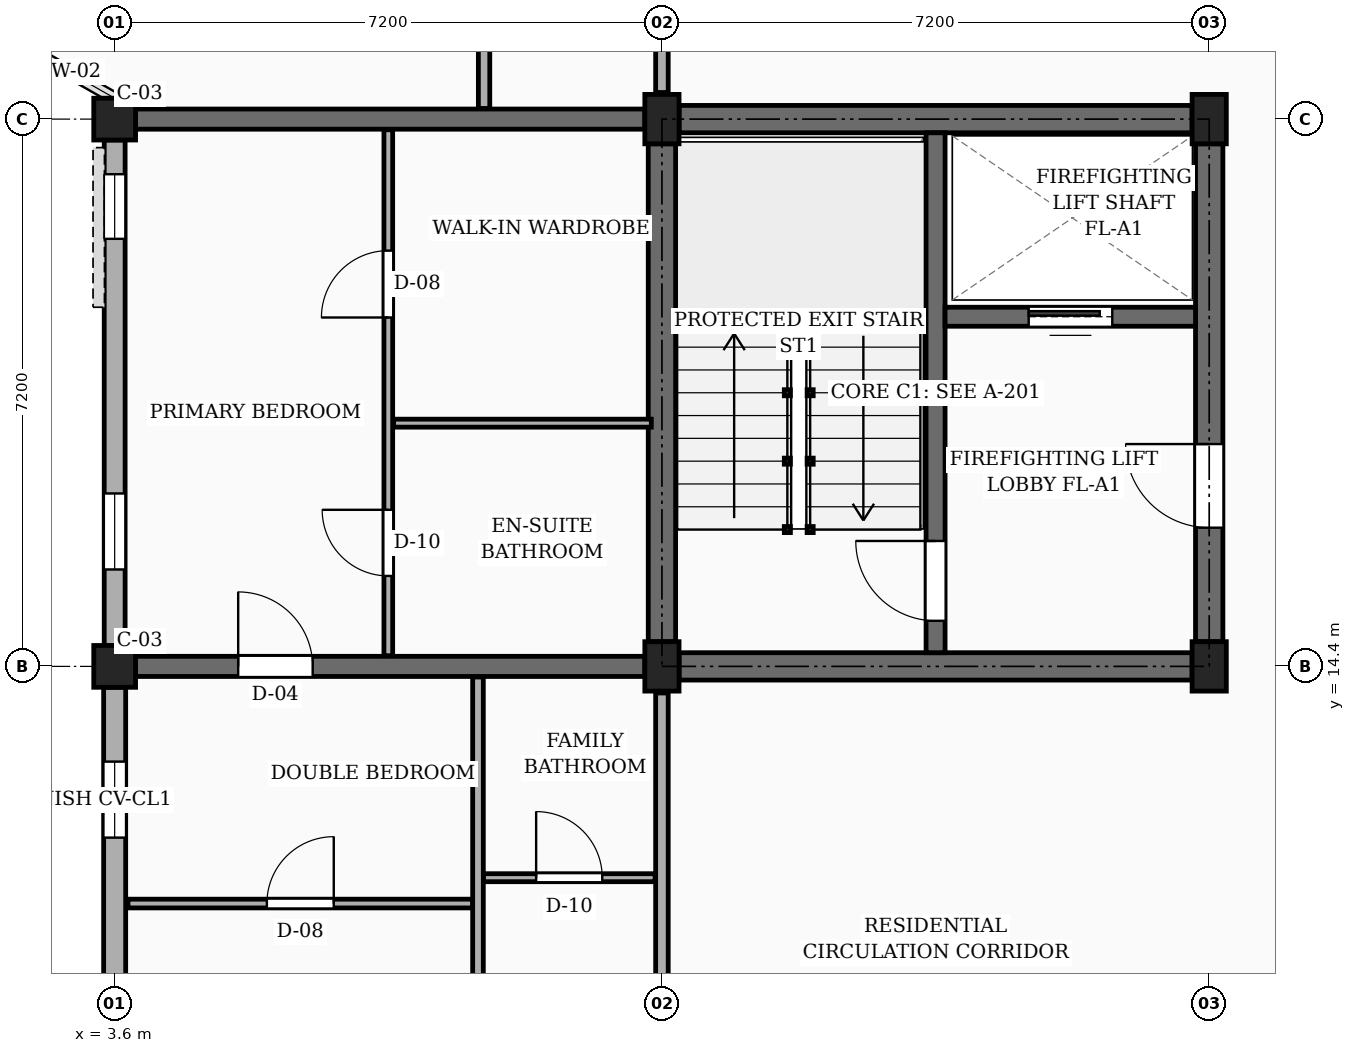
"""IFC4 building model, lengths in metres.
Left out: names, types, materials, properties, quantities, classifications, styles, units other than length and angle.
Written with IfcOpenShell. Run it as: python <this file> out.ifc"""

import sys

from ifc_helpers import new_model, si_unit, direction, frame, frame_2d, origin, origin_2d, place, context, subcontext, project, spatial, rectangle, extrude, element, fill, save


model = new_model("IFC4")
c1 = context("Model", 3, precision=1e-05, world=origin(), true_north=direction((0.0, 1.0)))
c2 = subcontext(c1, "Body", "Model", "MODEL_VIEW")
j1 = project(units=[si_unit("LENGTHUNIT", "METRE"), si_unit("PLANEANGLEUNIT", "RADIAN")], contexts=[c1])
p1 = place(None, origin())
s1 = spatial("IfcSite", under=j1, at=p1, CompositionType="ELEMENT")
p2 = place(p1, origin())
s2 = spatial("IfcBuilding", under=s1, at=p2, CompositionType="ELEMENT")
p3 = place(p2, frame((0.0, 0.0, 10.8)))
s3 = spatial("IfcBuildingStorey", under=s2, at=p3, CompositionType="ELEMENT", Elevation=10.8)
for number, where, z_axis, x_axis in (
    (1, (3.6, 14.4, 0.0), (0.0, 0.0, 1.0), (1.0, 0.0, 0.0)),
    (2, (3.6, 21.6, 0.0), (0.0, 0.0, 1.0), (1.0, 0.0, 0.0)),
):
    element("IfcColumn", number, at=place(p3, frame(where, z_axis=z_axis, x_axis=x_axis)), inside=s3, PredefinedType="COLUMN", context=c2, shape_type="SweptSolid", body=[
        extrude(rectangle(XDim=0.55, YDim=0.55, at=origin_2d()), origin(), (0.0, 0.0, 1.0), 3.15),
    ])
for number, where, z_axis, x_axis in (
    (3, (10.8, 14.4, 0.0), (0.0, 0.0, 1.0), (1.0, 0.0, 0.0)),
    (4, (10.8, 21.6, 0.0), (0.0, 0.0, 1.0), (1.0, 0.0, 0.0)),
    (5, (18.0, 14.4, 0.0), (0.0, 0.0, 1.0), (1.0, 0.0, 0.0)),
    (6, (18.0, 21.6, 0.0), (0.0, 0.0, 1.0), (1.0, 0.0, 0.0)),
):
    element("IfcColumn", number, at=place(p3, frame(where, z_axis=z_axis, x_axis=x_axis)), inside=s3, PredefinedType="COLUMN", context=c2, shape_type="SweptSolid", body=[
        extrude(rectangle(XDim=0.45, YDim=0.65, at=origin_2d()), origin(), (0.0, 0.0, 1.0), 3.15),
    ])
p4 = place(p3, frame((3.875, 14.4, 0.0), z_axis=(0.0, 0.0, 1.0), x_axis=(1.0, 0.0, 0.0)))
e7 = element("IfcWall", 7, at=p4, inside=s3, PredefinedType="SOLIDWALL", context=c2, shape_type="SweptSolid", body=[
    extrude(rectangle(XDim=6.7, YDim=0.265, at=frame_2d((3.35, 0.0))), origin(), (0.0, 0.0, 1.0), 2.17),
])
p5 = place(p4, frame((1.35, 0.0, 0.0)))
e8 = element("IfcOpeningElement", 8, at=p5, cuts=e7, PredefinedType="OPENING", context=c2, shape_type="SweptSolid", body=[
    extrude(rectangle(XDim=0.98, YDim=2.12, at=frame_2d((0.49, 1.06))), frame((0.0, 0.143, 0.0), z_axis=(0.0, -1.0, 0.0), x_axis=(1.0, 0.0, 0.0)), (0.0, 0.0, 1.0), 0.285),
])
p6 = place(p3, frame((3.875, 21.6, 0.0), z_axis=(0.0, 0.0, 1.0), x_axis=(1.0, 0.0, 0.0)))
e9 = element("IfcWall", 9, at=p6, inside=s3, PredefinedType="SOLIDWALL", context=c2, shape_type="SweptSolid", body=[
    extrude(rectangle(XDim=6.7, YDim=0.265, at=frame_2d((3.35, 0.0))), origin(), (0.0, 0.0, 1.0), 2.17),
])
p7 = place(p3, frame((3.6, 21.325, 0.0), z_axis=(0.0, 0.0, 1.0), x_axis=(0.0, -1.0, 0.0)))
e10 = element("IfcWall", 10, at=p7, inside=s3, PredefinedType="SOLIDWALL", context=c2, shape_type="SweptSolid", body=[
    extrude(rectangle(XDim=6.65, YDim=0.275, at=frame_2d((3.325, 0.0))), origin(), (0.0, 0.0, 1.0), 2.44),
])
p8 = place(p7, frame((0.45, 0.0, 0.78)))
e11 = element("IfcOpeningElement", 11, at=p8, cuts=e10, PredefinedType="OPENING", context=c2, shape_type="SweptSolid", body=[
    extrude(rectangle(XDim=0.85, YDim=1.15, at=frame_2d((0.425, 0.575))), frame((0.0, 0.147, 0.0), z_axis=(0.0, -1.0, 0.0), x_axis=(1.0, 0.0, 0.0)), (0.0, 0.0, 1.0), 0.295),
])
p9 = place(p7, frame((4.65, 0.0, 0.78)))
e12 = element("IfcOpeningElement", 12, at=p9, cuts=e10, PredefinedType="OPENING", context=c2, shape_type="SweptSolid", body=[
    extrude(rectangle(XDim=1.0, YDim=1.15, at=frame_2d((0.5, 0.575))), frame((0.0, 0.147, 0.0), z_axis=(0.0, -1.0, 0.0), x_axis=(1.0, 0.0, 0.0)), (0.0, 0.0, 1.0), 0.295),
])
p10 = place(p3, frame((3.6, 14.125, 0.0), z_axis=(0.0, 0.0, 1.0), x_axis=(0.0, -1.0, 0.0)))
e13 = element("IfcWall", 13, at=p10, inside=s3, PredefinedType="SOLIDWALL", context=c2, shape_type="SweptSolid", body=[
    extrude(rectangle(XDim=3.905, YDim=0.29, at=frame_2d((1.953, 0.0))), origin(), (0.0, 0.0, 1.0), 2.44),
])
p11 = place(p10, frame((0.978, 0.0, 0.78)))
e14 = element("IfcOpeningElement", 14, at=p11, cuts=e13, PredefinedType="OPENING", context=c2, shape_type="SweptSolid", body=[
    extrude(rectangle(XDim=1.0, YDim=1.15, at=frame_2d((0.5, 0.575))), frame((0.0, 0.155, 0.0), z_axis=(0.0, -1.0, 0.0), x_axis=(1.0, 0.0, 0.0)), (0.0, 0.0, 1.0), 0.31),
])
p12 = place(p3, frame((10.8, 14.725, 0.0), z_axis=(0.0, 0.0, 1.0), x_axis=(0.0, 1.0, 0.0)))
e15 = element("IfcWall", 15, at=p12, inside=s3, PredefinedType="SHEAR", context=c2, shape_type="SweptSolid", body=[
    extrude(rectangle(XDim=6.55, YDim=0.36, at=frame_2d((3.275, 0.0))), origin(), (0.0, 0.0, 1.0), 2.87),
])
p13 = place(p3, frame((11.025, 21.6, 0.0), z_axis=(0.0, 0.0, 1.0), x_axis=(1.0, 0.0, 0.0)))
e16 = element("IfcWall", 16, at=p13, inside=s3, PredefinedType="SHEAR", context=c2, shape_type="SweptSolid", body=[
    extrude(rectangle(XDim=6.75, YDim=0.36, at=frame_2d((3.375, 0.0))), origin(), (0.0, 0.0, 1.0), 2.87),
])
p14 = place(p3, frame((18.0, 14.725, 0.0), z_axis=(0.0, 0.0, 1.0), x_axis=(0.0, 1.0, 0.0)))
e17 = element("IfcWall", 17, at=p14, inside=s3, PredefinedType="SHEAR", context=c2, shape_type="SweptSolid", body=[
    extrude(rectangle(XDim=6.55, YDim=0.36, at=frame_2d((3.275, 0.0))), origin(), (0.0, 0.0, 1.0), 2.87),
])
p15 = place(p14, frame((1.5, 0.0, 0.0)))
e18 = element("IfcOpeningElement", 18, at=p15, cuts=e17, PredefinedType="OPENING", context=c2, shape_type="SweptSolid", body=[
    extrude(rectangle(XDim=1.1, YDim=2.15, at=frame_2d((0.55, 1.075))), frame((0.0, 0.19, 0.0), z_axis=(0.0, -1.0, 0.0), x_axis=(1.0, 0.0, 0.0)), (0.0, 0.0, 1.0), 0.38),
])
p16 = place(p3, frame((11.025, 14.4, 0.0), z_axis=(0.0, 0.0, 1.0), x_axis=(1.0, 0.0, 0.0)))
e19 = element("IfcWall", 19, at=p16, inside=s3, PredefinedType="SHEAR", context=c2, shape_type="SweptSolid", body=[
    extrude(rectangle(XDim=6.75, YDim=0.36, at=frame_2d((3.375, 0.0))), origin(), (0.0, 0.0, 1.0), 2.87),
])
p17 = place(p3, frame((14.4, 14.58, 0.0), z_axis=(0.0, 0.0, 1.0), x_axis=(0.0, 1.0, 0.0)))
e20 = element("IfcWall", 20, at=p17, inside=s3, PredefinedType="SHEAR", context=c2, shape_type="SweptSolid", body=[
    extrude(rectangle(XDim=6.84, YDim=0.25, at=frame_2d((3.42, 0.0))), origin(), (0.0, 0.0, 1.0), 2.87),
])
p18 = place(p17, frame((0.42, 0.0, 0.0)))
e21 = element("IfcOpeningElement", 21, at=p18, cuts=e20, PredefinedType="OPENING", context=c2, shape_type="SweptSolid", body=[
    extrude(rectangle(XDim=1.05, YDim=2.15, at=frame_2d((0.525, 1.075))), frame((0.0, 0.135, 0.0), z_axis=(0.0, -1.0, 0.0), x_axis=(1.0, 0.0, 0.0)), (0.0, 0.0, 1.0), 0.27),
])
p19 = place(p3, frame((14.525, 19.0, 0.0), z_axis=(0.0, 0.0, 1.0), x_axis=(1.0, 0.0, 0.0)))
e22 = element("IfcWall", 22, at=p19, inside=s3, PredefinedType="SHEAR", context=c2, shape_type="SweptSolid", body=[
    extrude(rectangle(XDim=3.295, YDim=0.25, at=frame_2d((1.647, 0.0))), origin(), (0.0, 0.0, 1.0), 2.87),
])
p20 = place(p19, frame((1.1, 0.0, 0.0)))
e23 = element("IfcOpeningElement", 23, at=p20, cuts=e22, PredefinedType="OPENING", context=c2, shape_type="SweptSolid", body=[
    extrude(rectangle(XDim=1.1, YDim=2.2, at=frame_2d((0.55, 1.1))), frame((0.0, 0.135, 0.0), z_axis=(0.0, -1.0, 0.0), x_axis=(1.0, 0.0, 0.0)), (0.0, 0.0, 1.0), 0.27),
])
p21 = place(p3, frame((10.8, 7.55, 0.0), z_axis=(0.0, 0.0, 1.0), x_axis=(0.0, 1.0, 0.0)))
e24 = element("IfcWall", 24, at=p21, inside=s3, PredefinedType="PARTITIONING", context=c2, shape_type="SweptSolid", body=[
    extrude(rectangle(XDim=6.5, YDim=0.165, at=frame_2d((3.25, 0.0))), origin(), (0.0, 0.0, 1.0), 2.22),
])
p22 = place(p21, frame((1.0, 0.0, 0.0)))
e25 = element("IfcOpeningElement", 25, at=p22, cuts=e24, PredefinedType="OPENING", context=c2, shape_type="SweptSolid", body=[
    extrude(rectangle(XDim=0.94, YDim=2.12, at=frame_2d((0.47, 1.06))), frame((0.0, 0.093, 0.0), z_axis=(0.0, -1.0, 0.0), x_axis=(1.0, 0.0, 0.0)), (0.0, 0.0, 1.0), 0.185),
])
p23 = place(p3, frame((10.8, 21.95, 0.0), z_axis=(0.0, 0.0, 1.0), x_axis=(0.0, 1.0, 0.0)))
e26 = element("IfcWall", 26, at=p23, inside=s3, PredefinedType="PARTITIONING", context=c2, shape_type="SweptSolid", body=[
    extrude(rectangle(XDim=6.5, YDim=0.165, at=frame_2d((3.25, 0.0))), origin(), (0.0, 0.0, 1.0), 2.22),
])
p24 = place(p23, frame((1.0, 0.0, 0.0)))
e27 = element("IfcOpeningElement", 27, at=p24, cuts=e26, PredefinedType="OPENING", context=c2, shape_type="SweptSolid", body=[
    extrude(rectangle(XDim=1.14, YDim=2.18, at=frame_2d((0.57, 1.09))), frame((0.0, 0.093, 0.0), z_axis=(0.0, -1.0, 0.0), x_axis=(1.0, 0.0, 0.0)), (0.0, 0.0, 1.0), 0.185),
])
p25 = place(p3, frame((3.775, 11.28, 0.0), z_axis=(0.0, 0.0, 1.0), x_axis=(1.0, 0.0, 0.0)))
e28 = element("IfcWall", 28, at=p25, inside=s3, PredefinedType="PARTITIONING", context=c2, shape_type="SweptSolid", body=[
    extrude(rectangle(XDim=4.535, YDim=0.115, at=frame_2d((2.268, 0.0))), origin(), (0.0, 0.0, 1.0), 2.305),
])
p26 = place(p25, frame((1.827, 0.0, 0.0)))
e29 = element("IfcOpeningElement", 29, at=p26, cuts=e28, PredefinedType="OPENING", context=c2, shape_type="SweptSolid", body=[
    extrude(rectangle(XDim=0.88, YDim=2.08, at=frame_2d((0.44, 1.04))), frame((0.0, 0.067, 0.0), z_axis=(0.0, -1.0, 0.0), x_axis=(1.0, 0.0, 0.0)), (0.0, 0.0, 1.0), 0.135),
])
p27 = place(p3, frame((8.45, 11.62, 0.0), z_axis=(0.0, 0.0, 1.0), x_axis=(1.0, 0.0, 0.0)))
e30 = element("IfcWall", 30, at=p27, inside=s3, PredefinedType="PARTITIONING", context=c2, shape_type="SweptSolid", body=[
    extrude(rectangle(XDim=2.26, YDim=0.105, at=frame_2d((1.13, 0.0))), origin(), (0.0, 0.0, 1.0), 2.305),
])
p28 = place(p27, frame((0.695, 0.0, 0.0)))
e31 = element("IfcOpeningElement", 31, at=p28, cuts=e30, PredefinedType="OPENING", context=c2, shape_type="SweptSolid", body=[
    extrude(rectangle(XDim=0.87, YDim=2.05, at=frame_2d((0.435, 1.025))), frame((0.0, 0.062, 0.0), z_axis=(0.0, -1.0, 0.0), x_axis=(1.0, 0.0, 0.0)), (0.0, 0.0, 1.0), 0.125),
])
p29 = place(p3, frame((8.38, 7.375, 0.0), z_axis=(0.0, 0.0, 1.0), x_axis=(0.0, 1.0, 0.0)))
e32 = element("IfcWall", 32, at=p29, inside=s3, PredefinedType="PARTITIONING", context=c2, shape_type="SweptSolid", body=[
    extrude(rectangle(XDim=6.885, YDim=0.14, at=frame_2d((3.442, 0.0))), origin(), (0.0, 0.0, 1.0), 2.305),
])
p30 = place(p29, frame((1.275, 0.0, 0.0)))
e33 = element("IfcOpeningElement", 33, at=p30, cuts=e32, PredefinedType="OPENING", context=c2, shape_type="SweptSolid", body=[
    extrude(rectangle(XDim=0.92, YDim=2.1, at=frame_2d((0.46, 1.05))), frame((0.0, 0.08, 0.0), z_axis=(0.0, -1.0, 0.0), x_axis=(1.0, 0.0, 0.0)), (0.0, 0.0, 1.0), 0.16),
])
p31 = place(p3, frame((7.2, 14.54, 0.0), z_axis=(0.0, 0.0, 1.0), x_axis=(0.0, 1.0, 0.0)))
e34 = element("IfcWall", 34, at=p31, inside=s3, PredefinedType="PARTITIONING", context=c2, shape_type="SweptSolid", body=[
    extrude(rectangle(XDim=6.92, YDim=0.115, at=frame_2d((3.46, 0.0))), origin(), (0.0, 0.0, 1.0), 2.305),
])
p32 = place(p31, frame((1.05, 0.0, 0.0)))
e35 = element("IfcOpeningElement", 35, at=p32, cuts=e34, PredefinedType="OPENING", context=c2, shape_type="SweptSolid", body=[
    extrude(rectangle(XDim=0.87, YDim=2.05, at=frame_2d((0.435, 1.025))), frame((0.0, 0.067, 0.0), z_axis=(0.0, -1.0, 0.0), x_axis=(1.0, 0.0, 0.0)), (0.0, 0.0, 1.0), 0.135),
])
p33 = place(p31, frame((4.45, 0.0, 0.0)))
e36 = element("IfcOpeningElement", 36, at=p33, cuts=e34, PredefinedType="OPENING", context=c2, shape_type="SweptSolid", body=[
    extrude(rectangle(XDim=0.88, YDim=2.08, at=frame_2d((0.44, 1.04))), frame((0.0, 0.067, 0.0), z_axis=(0.0, -1.0, 0.0), x_axis=(1.0, 0.0, 0.0)), (0.0, 0.0, 1.0), 0.135),
])
p34 = place(p3, frame((7.27, 17.6, 0.0), z_axis=(0.0, 0.0, 1.0), x_axis=(1.0, 0.0, 0.0)))
e37 = element("IfcWall", 37, at=p34, inside=s3, PredefinedType="PARTITIONING", context=c2, shape_type="SweptSolid", body=[
    extrude(rectangle(XDim=3.39, YDim=0.105, at=frame_2d((1.695, 0.0))), origin(), (0.0, 0.0, 1.0), 2.305),
])
p35 = place(p3, frame((8.46, 21.74, 0.0), z_axis=(0.0, 0.0, 1.0), x_axis=(0.0, 1.0, 0.0)))
e38 = element("IfcWall", 38, at=p35, inside=s3, PredefinedType="PARTITIONING", context=c2, shape_type="SweptSolid", body=[
    extrude(rectangle(XDim=6.92, YDim=0.15, at=frame_2d((3.46, 0.0))), origin(), (0.0, 0.0, 1.0), 2.305),
])
p36 = place(p35, frame((1.31, 0.0, 0.0)))
e39 = element("IfcOpeningElement", 39, at=p36, cuts=e38, PredefinedType="OPENING", context=c2, shape_type="SweptSolid", body=[
    extrude(rectangle(XDim=0.92, YDim=2.1, at=frame_2d((0.46, 1.05))), frame((0.0, 0.085, 0.0), z_axis=(0.0, -1.0, 0.0), x_axis=(1.0, 0.0, 0.0)), (0.0, 0.0, 1.0), 0.17),
])
p37 = place(p8, origin())
e40 = element("IfcWindow", 40, at=p37, inside=s3, PartitioningType="SINGLE_PANEL", PredefinedType="WINDOW", context=c2, shape_type="SweptSolid", body=[
    extrude(rectangle(XDim=0.85, YDim=1.15, at=frame_2d((0.425, 0.575))), frame((0.0, 0.03, 0.0), z_axis=(0.0, -1.0, 0.0), x_axis=(1.0, 0.0, 0.0)), (0.0, 0.0, 1.0), 0.06),
])
fill(e11, e40)
p38 = place(p9, origin())
e41 = element("IfcWindow", 41, at=p38, inside=s3, PartitioningType="SINGLE_PANEL", PredefinedType="WINDOW", context=c2, shape_type="SweptSolid", body=[
    extrude(rectangle(XDim=1.0, YDim=1.15, at=frame_2d((0.5, 0.575))), frame((0.0, 0.03, 0.0), z_axis=(0.0, -1.0, 0.0), x_axis=(1.0, 0.0, 0.0)), (0.0, 0.0, 1.0), 0.06),
])
fill(e12, e41)
p39 = place(p11, origin())
e42 = element("IfcWindow", 42, at=p39, inside=s3, PartitioningType="SINGLE_PANEL", PredefinedType="WINDOW", context=c2, shape_type="SweptSolid", body=[
    extrude(rectangle(XDim=1.0, YDim=1.15, at=frame_2d((0.5, 0.575))), frame((0.0, 0.03, 0.0), z_axis=(0.0, -1.0, 0.0), x_axis=(1.0, 0.0, 0.0)), (0.0, 0.0, 1.0), 0.06),
])
fill(e14, e42)
p40 = place(p15, frame((1.1, 0.0, 0.0), z_axis=(0.0, 0.0, 1.0), x_axis=(-1.0, 0.0, 0.0)))
e43 = element("IfcDoor", 43, at=p40, inside=s3, OperationType="SINGLE_SWING_RIGHT", PredefinedType="DOOR", context=c2, shape_type="SweptSolid", body=[
    extrude(rectangle(XDim=1.1, YDim=2.15, at=frame_2d((0.55, 1.075))), frame((0.0, 0.025, 0.0), z_axis=(0.0, -1.0, 0.0), x_axis=(1.0, 0.0, 0.0)), (0.0, 0.0, 1.0), 0.05),
])
fill(e18, e43)
p41 = place(p18, origin())
e44 = element("IfcDoor", 44, at=p41, inside=s3, OperationType="SINGLE_SWING_RIGHT", PredefinedType="DOOR", context=c2, shape_type="SweptSolid", body=[
    extrude(rectangle(XDim=1.05, YDim=2.15, at=frame_2d((0.525, 1.075))), frame((0.0, 0.025, 0.0), z_axis=(0.0, -1.0, 0.0), x_axis=(1.0, 0.0, 0.0)), (0.0, 0.0, 1.0), 0.05),
])
fill(e21, e44)
p42 = place(p20, origin())
e45 = element("IfcDoor", 45, at=p42, inside=s3, OperationType="SLIDING_TO_LEFT", PredefinedType="DOOR", context=c2, shape_type="SweptSolid", body=[
    extrude(rectangle(XDim=1.1, YDim=2.2, at=frame_2d((0.55, 1.1))), frame((0.0, 0.025, 0.0), z_axis=(0.0, -1.0, 0.0), x_axis=(1.0, 0.0, 0.0)), (0.0, 0.0, 1.0), 0.05),
])
fill(e23, e45)
p43 = place(p26, origin())
e46 = element("IfcDoor", 46, at=p43, inside=s3, OperationType="SINGLE_SWING_RIGHT", PredefinedType="DOOR", context=c2, shape_type="SweptSolid", body=[
    extrude(rectangle(XDim=0.88, YDim=2.08, at=frame_2d((0.44, 1.04))), frame((0.0, 0.025, 0.0), z_axis=(0.0, -1.0, 0.0), x_axis=(1.0, 0.0, 0.0)), (0.0, 0.0, 1.0), 0.05),
])
fill(e29, e46)
p44 = place(p28, origin())
e47 = element("IfcDoor", 47, at=p44, inside=s3, OperationType="SINGLE_SWING_LEFT", PredefinedType="DOOR", context=c2, shape_type="SweptSolid", body=[
    extrude(rectangle(XDim=0.87, YDim=2.05, at=frame_2d((0.435, 1.025))), frame((0.0, 0.025, 0.0), z_axis=(0.0, -1.0, 0.0), x_axis=(1.0, 0.0, 0.0)), (0.0, 0.0, 1.0), 0.05),
])
fill(e31, e47)
p45 = place(p32, origin())
e48 = element("IfcDoor", 48, at=p45, inside=s3, OperationType="SINGLE_SWING_RIGHT", PredefinedType="DOOR", context=c2, shape_type="SweptSolid", body=[
    extrude(rectangle(XDim=0.87, YDim=2.05, at=frame_2d((0.435, 1.025))), frame((0.0, 0.025, 0.0), z_axis=(0.0, -1.0, 0.0), x_axis=(1.0, 0.0, 0.0)), (0.0, 0.0, 1.0), 0.05),
])
fill(e35, e48)
p46 = place(p33, origin())
e49 = element("IfcDoor", 49, at=p46, inside=s3, OperationType="SINGLE_SWING_LEFT", PredefinedType="DOOR", context=c2, shape_type="SweptSolid", body=[
    extrude(rectangle(XDim=0.88, YDim=2.08, at=frame_2d((0.44, 1.04))), frame((0.0, 0.025, 0.0), z_axis=(0.0, -1.0, 0.0), x_axis=(1.0, 0.0, 0.0)), (0.0, 0.0, 1.0), 0.05),
])
fill(e36, e49)
p47 = place(p5, origin())
e50 = element("IfcDoor", 50, at=p47, inside=s3, OperationType="SINGLE_SWING_LEFT", PredefinedType="DOOR", context=c2, shape_type="SweptSolid", body=[
    extrude(rectangle(XDim=0.98, YDim=2.12, at=frame_2d((0.49, 1.06))), frame((0.0, 0.025, 0.0), z_axis=(0.0, -1.0, 0.0), x_axis=(1.0, 0.0, 0.0)), (0.0, 0.0, 1.0), 0.05),
])
fill(e8, e50)
save(model, sys.argv[1])
